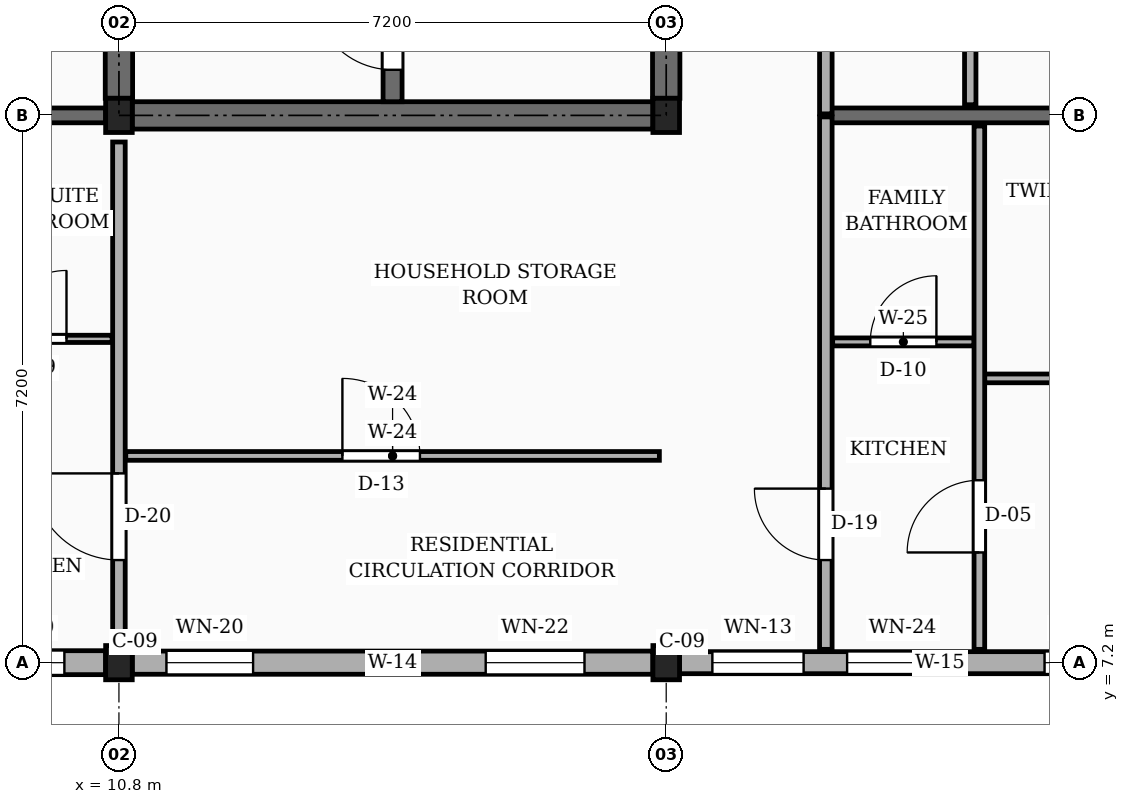
"""IFC4 building model, lengths in metres.
Left out: names, types, materials, properties, quantities, classifications, styles, units other than length and angle.
Written with IfcOpenShell. Run it as: python <this file> out.ifc"""

import sys

from ifc_helpers import new_model, si_unit, direction, frame, frame_2d, origin, origin_2d, place, context, subcontext, project, spatial, rectangle, extrude, element, fill, save


model = new_model("IFC4")
c1 = context("Model", 3, precision=1e-05, world=origin(), true_north=direction((0.0, 1.0)))
c2 = subcontext(c1, "Body", "Model", "MODEL_VIEW")
j1 = project(units=[si_unit("LENGTHUNIT", "METRE"), si_unit("PLANEANGLEUNIT", "RADIAN")], contexts=[c1])
p1 = place(None, origin())
s1 = spatial("IfcSite", under=j1, at=p1, CompositionType="ELEMENT")
p2 = place(p1, origin())
s2 = spatial("IfcBuilding", under=s1, at=p2, CompositionType="ELEMENT")
p3 = place(p2, frame((0.0, 0.0, 48.6)))
s3 = spatial("IfcBuildingStorey", under=s2, at=p3, CompositionType="ELEMENT", Elevation=48.6)
for number, where, z_axis, x_axis in (
    (1, (10.8, 7.2, 0.0), (0.0, 0.0, 1.0), (1.0, 0.0, 0.0)),
    (2, (10.8, 14.4, 0.0), (0.0, 0.0, 1.0), (1.0, 0.0, 0.0)),
    (3, (18.0, 7.2, 0.0), (0.0, 0.0, 1.0), (1.0, 0.0, 0.0)),
    (4, (18.0, 14.4, 0.0), (0.0, 0.0, 1.0), (1.0, 0.0, 0.0)),
):
    element("IfcColumn", number, at=place(p3, frame(where, z_axis=z_axis, x_axis=x_axis)), inside=s3, PredefinedType="COLUMN", context=c2, shape_type="SweptSolid", body=[
        extrude(rectangle(XDim=0.35, YDim=0.45, at=origin_2d()), origin(), (0.0, 0.0, 1.0), 3.15),
    ])
p4 = place(p3, frame((3.775, 14.4, 0.0), z_axis=(0.0, 0.0, 1.0), x_axis=(1.0, 0.0, 0.0)))
e5 = element("IfcWall", 5, at=p4, inside=s3, PredefinedType="SOLIDWALL", context=c2, shape_type="SweptSolid", body=[
    extrude(rectangle(XDim=6.85, YDim=0.195, at=frame_2d((3.425, 0.0))), origin(), (0.0, 0.0, 1.0), 2.22),
])
p5 = place(p4, frame((1.35, 0.0, 0.0)))
e6 = element("IfcOpeningElement", 6, at=p5, cuts=e5, PredefinedType="OPENING", context=c2, shape_type="SweptSolid", body=[
    extrude(rectangle(XDim=0.98, YDim=2.12, at=frame_2d((0.49, 1.06))), frame((0.0, 0.107, 0.0), z_axis=(0.0, -1.0, 0.0), x_axis=(1.0, 0.0, 0.0)), (0.0, 0.0, 1.0), 0.215),
])
p6 = place(p3, frame((20.1, 14.4, 0.0), z_axis=(0.0, 0.0, 1.0), x_axis=(1.0, 0.0, 0.0)))
e7 = element("IfcWall", 7, at=p6, inside=s3, PredefinedType="SOLIDWALL", context=c2, shape_type="SweptSolid", body=[
    extrude(rectangle(XDim=4.925, YDim=0.195, at=frame_2d((2.462, 0.0))), origin(), (0.0, 0.0, 1.0), 2.22),
])
p7 = place(p3, frame((3.775, 7.2, 0.0), z_axis=(0.0, 0.0, 1.0), x_axis=(1.0, 0.0, 0.0)))
e8 = element("IfcWall", 8, at=p7, inside=s3, PredefinedType="SOLIDWALL", context=c2, shape_type="SweptSolid", body=[
    extrude(rectangle(XDim=6.85, YDim=0.315, at=frame_2d((3.425, 0.0))), origin(), (0.0, 0.0, 1.0), 2.46),
])
p8 = place(p7, frame((1.962, 0.0, 0.78)))
e9 = element("IfcOpeningElement", 9, at=p8, cuts=e8, PredefinedType="OPENING", context=c2, shape_type="SweptSolid", body=[
    extrude(rectangle(XDim=0.98, YDim=1.36, at=frame_2d((0.49, 0.68))), frame((0.0, 0.167, 0.0), z_axis=(0.0, -1.0, 0.0), x_axis=(1.0, 0.0, 0.0)), (0.0, 0.0, 1.0), 0.335),
])
p9 = place(p7, frame((5.167, 0.0, 0.78)))
e10 = element("IfcOpeningElement", 10, at=p9, cuts=e8, PredefinedType="OPENING", context=c2, shape_type="SweptSolid", body=[
    extrude(rectangle(XDim=1.14, YDim=1.36, at=frame_2d((0.57, 0.68))), frame((0.0, 0.167, 0.0), z_axis=(0.0, -1.0, 0.0), x_axis=(1.0, 0.0, 0.0)), (0.0, 0.0, 1.0), 0.335),
])
p10 = place(p3, frame((10.975, 7.2, 0.0), z_axis=(0.0, 0.0, 1.0), x_axis=(1.0, 0.0, 0.0)))
e11 = element("IfcWall", 11, at=p10, inside=s3, PredefinedType="SOLIDWALL", context=c2, shape_type="SweptSolid", body=[
    extrude(rectangle(XDim=6.85, YDim=0.305, at=frame_2d((3.425, 0.0))), origin(), (0.0, 0.0, 1.0), 2.46),
])
p11 = place(p10, frame((0.45, 0.0, 0.78)))
e12 = element("IfcOpeningElement", 12, at=p11, cuts=e11, PredefinedType="OPENING", context=c2, shape_type="SweptSolid", body=[
    extrude(rectangle(XDim=1.14, YDim=1.36, at=frame_2d((0.57, 0.68))), frame((0.0, 0.163, 0.0), z_axis=(0.0, -1.0, 0.0), x_axis=(1.0, 0.0, 0.0)), (0.0, 0.0, 1.0), 0.325),
])
p12 = place(p10, frame((4.65, 0.0, 0.78)))
e13 = element("IfcOpeningElement", 13, at=p12, cuts=e11, PredefinedType="OPENING", context=c2, shape_type="SweptSolid", body=[
    extrude(rectangle(XDim=1.3, YDim=1.36, at=frame_2d((0.65, 0.68))), frame((0.0, 0.163, 0.0), z_axis=(0.0, -1.0, 0.0), x_axis=(1.0, 0.0, 0.0)), (0.0, 0.0, 1.0), 0.325),
])
p13 = place(p3, frame((18.175, 7.2, 0.0), z_axis=(0.0, 0.0, 1.0), x_axis=(1.0, 0.0, 0.0)))
e14 = element("IfcWall", 14, at=p13, inside=s3, PredefinedType="SOLIDWALL", context=c2, shape_type="SweptSolid", body=[
    extrude(rectangle(XDim=6.85, YDim=0.29, at=frame_2d((3.425, 0.0))), origin(), (0.0, 0.0, 1.0), 2.46),
])
p14 = place(p13, frame((0.433, 0.0, 0.78)))
e15 = element("IfcOpeningElement", 15, at=p14, cuts=e14, PredefinedType="OPENING", context=c2, shape_type="SweptSolid", body=[
    extrude(rectangle(XDim=1.2, YDim=1.26, at=frame_2d((0.6, 0.63))), frame((0.0, 0.155, 0.0), z_axis=(0.0, -1.0, 0.0), x_axis=(1.0, 0.0, 0.0)), (0.0, 0.0, 1.0), 0.31),
])
p15 = place(p13, frame((2.205, 0.0, 0.78)))
e16 = element("IfcOpeningElement", 16, at=p15, cuts=e14, PredefinedType="OPENING", context=c2, shape_type="SweptSolid", body=[
    extrude(rectangle(XDim=1.46, YDim=1.36, at=frame_2d((0.73, 0.68))), frame((0.0, 0.155, 0.0), z_axis=(0.0, -1.0, 0.0), x_axis=(1.0, 0.0, 0.0)), (0.0, 0.0, 1.0), 0.31),
])
p16 = place(p13, frame((4.802, 0.0, 0.78)))
e17 = element("IfcOpeningElement", 17, at=p16, cuts=e14, PredefinedType="OPENING", context=c2, shape_type="SweptSolid", body=[
    extrude(rectangle(XDim=1.05, YDim=1.44, at=frame_2d((0.525, 0.72))), frame((0.0, 0.155, 0.0), z_axis=(0.0, -1.0, 0.0), x_axis=(1.0, 0.0, 0.0)), (0.0, 0.0, 1.0), 0.31),
])
p17 = place(p3, frame((10.8, 14.625, 0.0), z_axis=(0.0, 0.0, 1.0), x_axis=(0.0, 1.0, 0.0)))
e18 = element("IfcWall", 18, at=p17, inside=s3, PredefinedType="SHEAR", context=c2, shape_type="SweptSolid", body=[
    extrude(rectangle(XDim=6.75, YDim=0.36, at=frame_2d((3.375, 0.0))), origin(), (0.0, 0.0, 1.0), 2.89),
])
p18 = place(p3, frame((18.0, 14.625, 0.0), z_axis=(0.0, 0.0, 1.0), x_axis=(0.0, 1.0, 0.0)))
e19 = element("IfcWall", 19, at=p18, inside=s3, PredefinedType="SHEAR", context=c2, shape_type="SweptSolid", body=[
    extrude(rectangle(XDim=6.75, YDim=0.36, at=frame_2d((3.375, 0.0))), origin(), (0.0, 0.0, 1.0), 2.89),
])
p19 = place(p18, frame((1.5, 0.0, 0.0)))
e20 = element("IfcOpeningElement", 20, at=p19, cuts=e19, PredefinedType="OPENING", context=c2, shape_type="SweptSolid", body=[
    extrude(rectangle(XDim=1.1, YDim=2.15, at=frame_2d((0.55, 1.075))), frame((0.0, 0.19, 0.0), z_axis=(0.0, -1.0, 0.0), x_axis=(1.0, 0.0, 0.0)), (0.0, 0.0, 1.0), 0.38),
])
p20 = place(p3, frame((10.975, 14.4, 0.0), z_axis=(0.0, 0.0, 1.0), x_axis=(1.0, 0.0, 0.0)))
e21 = element("IfcWall", 21, at=p20, inside=s3, PredefinedType="SHEAR", context=c2, shape_type="SweptSolid", body=[
    extrude(rectangle(XDim=6.85, YDim=0.36, at=frame_2d((3.425, 0.0))), origin(), (0.0, 0.0, 1.0), 2.89),
])
p21 = place(p3, frame((14.4, 14.58, 0.0), z_axis=(0.0, 0.0, 1.0), x_axis=(0.0, 1.0, 0.0)))
e22 = element("IfcWall", 22, at=p21, inside=s3, PredefinedType="SHEAR", context=c2, shape_type="SweptSolid", body=[
    extrude(rectangle(XDim=6.84, YDim=0.25, at=frame_2d((3.42, 0.0))), origin(), (0.0, 0.0, 1.0), 2.89),
])
p22 = place(p21, frame((0.42, 0.0, 0.0)))
e23 = element("IfcOpeningElement", 23, at=p22, cuts=e22, PredefinedType="OPENING", context=c2, shape_type="SweptSolid", body=[
    extrude(rectangle(XDim=1.05, YDim=2.15, at=frame_2d((0.525, 1.075))), frame((0.0, 0.135, 0.0), z_axis=(0.0, -1.0, 0.0), x_axis=(1.0, 0.0, 0.0)), (0.0, 0.0, 1.0), 0.27),
])
p23 = place(p3, frame((20.1, 7.375, 0.0), z_axis=(0.0, 0.0, 1.0), x_axis=(0.0, 1.0, 0.0)))
e24 = element("IfcWall", 24, at=p23, inside=s3, PredefinedType="PARTITIONING", context=c2, shape_type="SweptSolid", body=[
    extrude(rectangle(XDim=7.005, YDim=0.165, at=frame_2d((3.502, 0.0))), origin(), (0.0, 0.0, 1.0), 2.325),
])
p24 = place(p23, frame((1.175, 0.0, 0.0)))
e25 = element("IfcOpeningElement", 25, at=p24, cuts=e24, PredefinedType="OPENING", context=c2, shape_type="SweptSolid", body=[
    extrude(rectangle(XDim=0.94, YDim=2.12, at=frame_2d((0.47, 1.06))), frame((0.0, 0.093, 0.0), z_axis=(0.0, -1.0, 0.0), x_axis=(1.0, 0.0, 0.0)), (0.0, 0.0, 1.0), 0.185),
])
p25 = place(p3, frame((20.1, 14.42, 0.0), z_axis=(0.0, 0.0, 1.0), x_axis=(0.0, 1.0, 0.0)))
e26 = element("IfcWall", 26, at=p25, inside=s3, PredefinedType="PARTITIONING", context=c2, shape_type="SweptSolid", body=[
    extrude(rectangle(XDim=7.16, YDim=0.165, at=frame_2d((3.58, 0.0))), origin(), (0.0, 0.0, 1.0), 2.325),
])
p26 = place(p25, frame((4.78, 0.0, 0.0)))
e27 = element("IfcOpeningElement", 27, at=p26, cuts=e26, PredefinedType="OPENING", context=c2, shape_type="SweptSolid", body=[
    extrude(rectangle(XDim=1.14, YDim=2.18, at=frame_2d((0.57, 1.09))), frame((0.0, 0.093, 0.0), z_axis=(0.0, -1.0, 0.0), x_axis=(1.0, 0.0, 0.0)), (0.0, 0.0, 1.0), 0.185),
])
p27 = place(p3, frame((10.8, 7.55, 0.0), z_axis=(0.0, 0.0, 1.0), x_axis=(0.0, 1.0, 0.0)))
e28 = element("IfcWall", 28, at=p27, inside=s3, PredefinedType="PARTITIONING", context=c2, shape_type="SweptSolid", body=[
    extrude(rectangle(XDim=6.5, YDim=0.165, at=frame_2d((3.25, 0.0))), origin(), (0.0, 0.0, 1.0), 2.325),
])
p28 = place(p27, frame((1.0, 0.0, 0.0)))
e29 = element("IfcOpeningElement", 29, at=p28, cuts=e28, PredefinedType="OPENING", context=c2, shape_type="SweptSolid", body=[
    extrude(rectangle(XDim=1.14, YDim=2.18, at=frame_2d((0.57, 1.09))), frame((0.0, 0.093, 0.0), z_axis=(0.0, -1.0, 0.0), x_axis=(1.0, 0.0, 0.0)), (0.0, 0.0, 1.0), 0.185),
])
p29 = place(p3, frame((10.89, 9.92, 0.0), z_axis=(0.0, 0.0, 1.0), x_axis=(1.0, 0.0, 0.0)))
e30 = element("IfcWall", 30, at=p29, inside=s3, PredefinedType="PARTITIONING", context=c2, shape_type="SweptSolid", body=[
    extrude(rectangle(XDim=7.02, YDim=0.115, at=frame_2d((3.51, 0.0))), origin(), (0.0, 0.0, 1.0), 2.325),
])
p30 = place(p29, frame((2.85, 0.0, 0.0)))
e31 = element("IfcOpeningElement", 31, at=p30, cuts=e30, PredefinedType="OPENING", context=c2, shape_type="SweptSolid", body=[
    extrude(rectangle(XDim=1.02, YDim=2.15, at=frame_2d((0.51, 1.075))), frame((0.0, 0.067, 0.0), z_axis=(0.0, -1.0, 0.0), x_axis=(1.0, 0.0, 0.0)), (0.0, 0.0, 1.0), 0.135),
])
p31 = place(p3, frame((8.61, 11.46, 0.0), z_axis=(0.0, 0.0, 1.0), x_axis=(1.0, 0.0, 0.0)))
e32 = element("IfcWall", 32, at=p31, inside=s3, PredefinedType="PARTITIONING", context=c2, shape_type="SweptSolid", body=[
    extrude(rectangle(XDim=2.1, YDim=0.095, at=frame_2d((1.05, 0.0))), origin(), (0.0, 0.0, 1.0), 2.325),
])
p32 = place(p31, frame((0.6, 0.0, 0.0)))
e33 = element("IfcOpeningElement", 33, at=p32, cuts=e32, PredefinedType="OPENING", context=c2, shape_type="SweptSolid", body=[
    extrude(rectangle(XDim=0.9, YDim=2.05, at=frame_2d((0.45, 1.025))), frame((0.0, 0.058, 0.0), z_axis=(0.0, -1.0, 0.0), x_axis=(1.0, 0.0, 0.0)), (0.0, 0.0, 1.0), 0.115),
])
p33 = place(p3, frame((22.19, 10.94, 0.0), z_axis=(0.0, 0.0, 1.0), x_axis=(1.0, 0.0, 0.0)))
e34 = element("IfcWall", 34, at=p33, inside=s3, PredefinedType="PARTITIONING", context=c2, shape_type="SweptSolid", body=[
    extrude(rectangle(XDim=2.835, YDim=0.115, at=frame_2d((1.417, 0.0))), origin(), (0.0, 0.0, 1.0), 2.325),
])
p34 = place(p33, frame((0.968, 0.0, 0.0)))
e35 = element("IfcOpeningElement", 35, at=p34, cuts=e34, PredefinedType="OPENING", context=c2, shape_type="SweptSolid", body=[
    extrude(rectangle(XDim=0.9, YDim=2.1, at=frame_2d((0.45, 1.05))), frame((0.0, 0.067, 0.0), z_axis=(0.0, -1.0, 0.0), x_axis=(1.0, 0.0, 0.0)), (0.0, 0.0, 1.0), 0.135),
])
p35 = place(p3, frame((20.19, 11.42, 0.0), z_axis=(0.0, 0.0, 1.0), x_axis=(1.0, 0.0, 0.0)))
e36 = element("IfcWall", 36, at=p35, inside=s3, PredefinedType="PARTITIONING", context=c2, shape_type="SweptSolid", body=[
    extrude(rectangle(XDim=1.86, YDim=0.105, at=frame_2d((0.93, 0.0))), origin(), (0.0, 0.0, 1.0), 2.325),
])
p36 = place(p35, frame((0.495, 0.0, 0.0)))
e37 = element("IfcOpeningElement", 37, at=p36, cuts=e36, PredefinedType="OPENING", context=c2, shape_type="SweptSolid", body=[
    extrude(rectangle(XDim=0.87, YDim=2.05, at=frame_2d((0.435, 1.025))), frame((0.0, 0.062, 0.0), z_axis=(0.0, -1.0, 0.0), x_axis=(1.0, 0.0, 0.0)), (0.0, 0.0, 1.0), 0.125),
])
p37 = place(p3, frame((22.12, 7.375, 0.0), z_axis=(0.0, 0.0, 1.0), x_axis=(0.0, 1.0, 0.0)))
e38 = element("IfcWall", 38, at=p37, inside=s3, PredefinedType="PARTITIONING", context=c2, shape_type="SweptSolid", body=[
    extrude(rectangle(XDim=6.885, YDim=0.14, at=frame_2d((3.442, 0.0))), origin(), (0.0, 0.0, 1.0), 2.325),
])
p38 = place(p37, frame((1.275, 0.0, 0.0)))
e39 = element("IfcOpeningElement", 39, at=p38, cuts=e38, PredefinedType="OPENING", context=c2, shape_type="SweptSolid", body=[
    extrude(rectangle(XDim=0.95, YDim=2.1, at=frame_2d((0.475, 1.05))), frame((0.0, 0.08, 0.0), z_axis=(0.0, -1.0, 0.0), x_axis=(1.0, 0.0, 0.0)), (0.0, 0.0, 1.0), 0.16),
])
p39 = place(p3, frame((22.0, 14.54, 0.0), z_axis=(0.0, 0.0, 1.0), x_axis=(0.0, 1.0, 0.0)))
e40 = element("IfcWall", 40, at=p39, inside=s3, PredefinedType="PARTITIONING", context=c2, shape_type="SweptSolid", body=[
    extrude(rectangle(XDim=6.92, YDim=0.15, at=frame_2d((3.46, 0.0))), origin(), (0.0, 0.0, 1.0), 2.325),
])
p40 = place(p39, frame((4.66, 0.0, 0.0)))
e41 = element("IfcOpeningElement", 41, at=p40, cuts=e40, PredefinedType="OPENING", context=c2, shape_type="SweptSolid", body=[
    extrude(rectangle(XDim=0.92, YDim=2.1, at=frame_2d((0.46, 1.05))), frame((0.0, 0.085, 0.0), z_axis=(0.0, -1.0, 0.0), x_axis=(1.0, 0.0, 0.0)), (0.0, 0.0, 1.0), 0.17),
])
p41 = place(p9, origin())
e42 = element("IfcWindow", 42, at=p41, inside=s3, PartitioningType="SINGLE_PANEL", PredefinedType="WINDOW", context=c2, shape_type="SweptSolid", body=[
    extrude(rectangle(XDim=1.14, YDim=1.36, at=frame_2d((0.57, 0.68))), frame((0.0, 0.03, 0.0), z_axis=(0.0, -1.0, 0.0), x_axis=(1.0, 0.0, 0.0)), (0.0, 0.0, 1.0), 0.06),
])
fill(e10, e42)
p42 = place(p11, origin())
e43 = element("IfcWindow", 43, at=p42, inside=s3, PartitioningType="SINGLE_PANEL", PredefinedType="WINDOW", context=c2, shape_type="SweptSolid", body=[
    extrude(rectangle(XDim=1.14, YDim=1.36, at=frame_2d((0.57, 0.68))), frame((0.0, 0.03, 0.0), z_axis=(0.0, -1.0, 0.0), x_axis=(1.0, 0.0, 0.0)), (0.0, 0.0, 1.0), 0.06),
])
fill(e12, e43)
p43 = place(p12, origin())
e44 = element("IfcWindow", 44, at=p43, inside=s3, PartitioningType="SINGLE_PANEL", PredefinedType="WINDOW", context=c2, shape_type="SweptSolid", body=[
    extrude(rectangle(XDim=1.3, YDim=1.36, at=frame_2d((0.65, 0.68))), frame((0.0, 0.03, 0.0), z_axis=(0.0, -1.0, 0.0), x_axis=(1.0, 0.0, 0.0)), (0.0, 0.0, 1.0), 0.06),
])
fill(e13, e44)
p44 = place(p14, origin())
e45 = element("IfcWindow", 45, at=p44, inside=s3, PartitioningType="SINGLE_PANEL", PredefinedType="WINDOW", context=c2, shape_type="SweptSolid", body=[
    extrude(rectangle(XDim=1.2, YDim=1.26, at=frame_2d((0.6, 0.63))), frame((0.0, 0.03, 0.0), z_axis=(0.0, -1.0, 0.0), x_axis=(1.0, 0.0, 0.0)), (0.0, 0.0, 1.0), 0.06),
])
fill(e15, e45)
p45 = place(p15, origin())
e46 = element("IfcWindow", 46, at=p45, inside=s3, PartitioningType="SINGLE_PANEL", PredefinedType="WINDOW", context=c2, shape_type="SweptSolid", body=[
    extrude(rectangle(XDim=1.46, YDim=1.36, at=frame_2d((0.73, 0.68))), frame((0.0, 0.03, 0.0), z_axis=(0.0, -1.0, 0.0), x_axis=(1.0, 0.0, 0.0)), (0.0, 0.0, 1.0), 0.06),
])
fill(e16, e46)
p46 = place(p16, origin())
e47 = element("IfcWindow", 47, at=p46, inside=s3, PartitioningType="SINGLE_PANEL", PredefinedType="WINDOW", context=c2, shape_type="SweptSolid", body=[
    extrude(rectangle(XDim=1.05, YDim=1.44, at=frame_2d((0.525, 0.72))), frame((0.0, 0.03, 0.0), z_axis=(0.0, -1.0, 0.0), x_axis=(1.0, 0.0, 0.0)), (0.0, 0.0, 1.0), 0.06),
])
fill(e17, e47)
p47 = place(p22, origin())
e48 = element("IfcDoor", 48, at=p47, inside=s3, OperationType="SINGLE_SWING_RIGHT", PredefinedType="DOOR", context=c2, shape_type="SweptSolid", body=[
    extrude(rectangle(XDim=1.05, YDim=2.15, at=frame_2d((0.525, 1.075))), frame((0.0, 0.025, 0.0), z_axis=(0.0, -1.0, 0.0), x_axis=(1.0, 0.0, 0.0)), (0.0, 0.0, 1.0), 0.05),
])
fill(e23, e48)
p48 = place(p24, origin())
e49 = element("IfcDoor", 49, at=p48, inside=s3, OperationType="SINGLE_SWING_RIGHT", PredefinedType="DOOR", context=c2, shape_type="SweptSolid", body=[
    extrude(rectangle(XDim=0.94, YDim=2.12, at=frame_2d((0.47, 1.06))), frame((0.0, 0.025, 0.0), z_axis=(0.0, -1.0, 0.0), x_axis=(1.0, 0.0, 0.0)), (0.0, 0.0, 1.0), 0.05),
])
fill(e25, e49)
p49 = place(p28, origin())
e50 = element("IfcDoor", 50, at=p49, inside=s3, OperationType="SINGLE_SWING_RIGHT", PredefinedType="DOOR", context=c2, shape_type="SweptSolid", body=[
    extrude(rectangle(XDim=1.14, YDim=2.18, at=frame_2d((0.57, 1.09))), frame((0.0, 0.025, 0.0), z_axis=(0.0, -1.0, 0.0), x_axis=(1.0, 0.0, 0.0)), (0.0, 0.0, 1.0), 0.05),
])
fill(e29, e50)
p50 = place(p30, origin())
e51 = element("IfcDoor", 51, at=p50, inside=s3, OperationType="SINGLE_SWING_LEFT", PredefinedType="DOOR", context=c2, shape_type="SweptSolid", body=[
    extrude(rectangle(XDim=1.02, YDim=2.15, at=frame_2d((0.51, 1.075))), frame((0.0, 0.025, 0.0), z_axis=(0.0, -1.0, 0.0), x_axis=(1.0, 0.0, 0.0)), (0.0, 0.0, 1.0), 0.05),
])
fill(e31, e51)
p51 = place(p32, origin())
e52 = element("IfcDoor", 52, at=p51, inside=s3, OperationType="SINGLE_SWING_RIGHT", PredefinedType="DOOR", context=c2, shape_type="SweptSolid", body=[
    extrude(rectangle(XDim=0.9, YDim=2.05, at=frame_2d((0.45, 1.025))), frame((0.0, 0.025, 0.0), z_axis=(0.0, -1.0, 0.0), x_axis=(1.0, 0.0, 0.0)), (0.0, 0.0, 1.0), 0.05),
])
fill(e33, e52)
p52 = place(p36, origin())
e53 = element("IfcDoor", 53, at=p52, inside=s3, OperationType="SINGLE_SWING_RIGHT", PredefinedType="DOOR", context=c2, shape_type="SweptSolid", body=[
    extrude(rectangle(XDim=0.87, YDim=2.05, at=frame_2d((0.435, 1.025))), frame((0.0, 0.025, 0.0), z_axis=(0.0, -1.0, 0.0), x_axis=(1.0, 0.0, 0.0)), (0.0, 0.0, 1.0), 0.05),
])
fill(e37, e53)
p53 = place(p38, origin())
e54 = element("IfcDoor", 54, at=p53, inside=s3, OperationType="SINGLE_SWING_LEFT", PredefinedType="DOOR", context=c2, shape_type="SweptSolid", body=[
    extrude(rectangle(XDim=0.95, YDim=2.1, at=frame_2d((0.475, 1.05))), frame((0.0, 0.025, 0.0), z_axis=(0.0, -1.0, 0.0), x_axis=(1.0, 0.0, 0.0)), (0.0, 0.0, 1.0), 0.05),
])
fill(e39, e54)
save(model, sys.argv[1])
